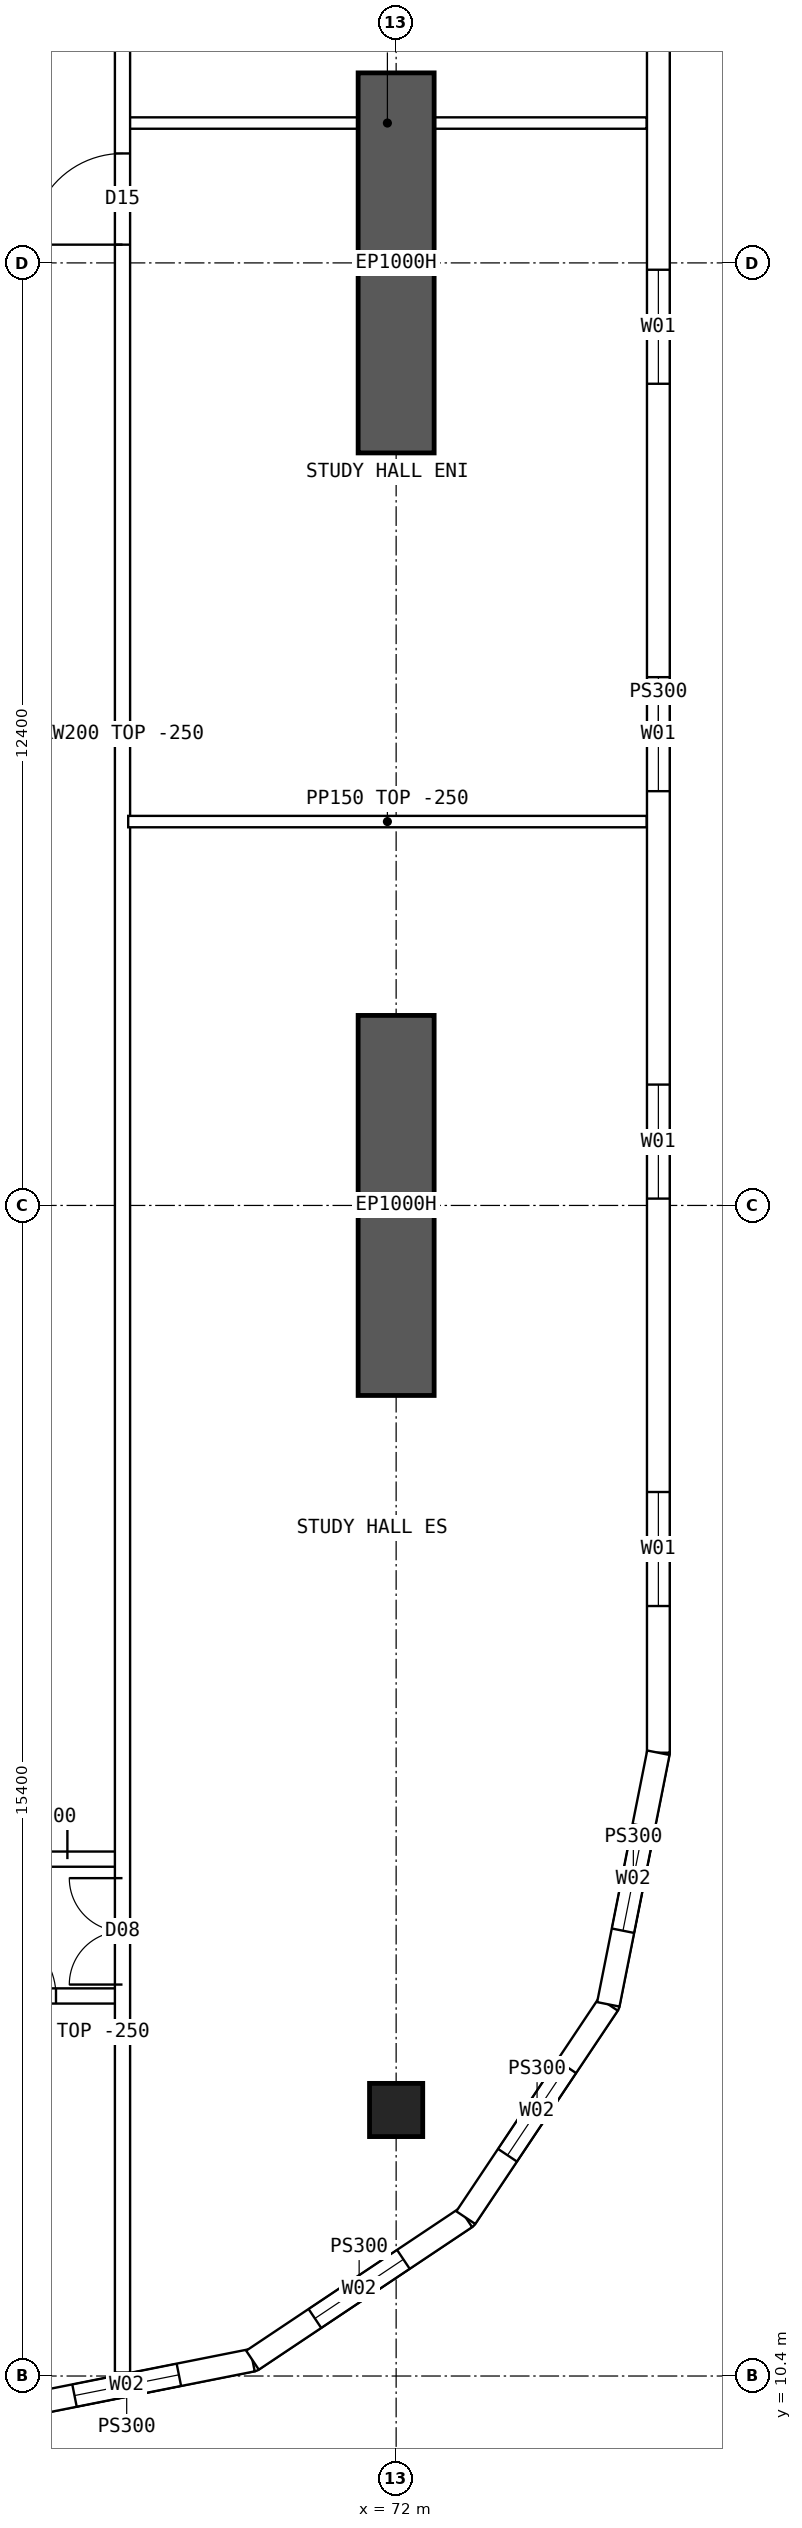
"""IFC4 building model, lengths in metres.
Left out: names, types, materials, properties, quantities, classifications, styles, units other than length and angle.
Written with IfcOpenShell. Run it as: python <this file> out.ifc"""

import sys

from ifc_helpers import new_model, si_unit, direction, frame, frame_2d, origin, origin_2d, place, context, subcontext, project, spatial, polyline, rectangle, hollow_rectangle, outline, extrude, element, fill, save


model = new_model("IFC4")
c1 = context("Model", 3, precision=1e-05, world=origin(), true_north=direction((0.0, 1.0)))
c2 = subcontext(c1, "Body", "Model", "MODEL_VIEW")
j1 = project(units=[si_unit("LENGTHUNIT", "METRE"), si_unit("PLANEANGLEUNIT", "RADIAN")], contexts=[c1])
p1 = place(None, origin())
s1 = spatial("IfcSite", under=j1, at=p1, CompositionType="ELEMENT")
p2 = place(p1, origin())
s2 = spatial("IfcBuilding", under=s1, at=p2, CompositionType="ELEMENT")
p3 = place(p2, frame((0.0, 0.0, 152.35)))
s3 = spatial("IfcBuildingStorey", under=s2, at=p3, CompositionType="ELEMENT", Elevation=152.35)
p4 = place(p3, frame((72.0, 13.9, 0.0), z_axis=(0.0, 0.0, 1.0), x_axis=(1.0, 0.0, 0.0)))
e1 = element("IfcColumn", 1, at=p4, inside=s3, PredefinedType="COLUMN", context=c2, shape_type="SweptSolid", body=[
    extrude(hollow_rectangle(XDim=0.7, YDim=0.7, WallThickness=0.07, at=origin_2d()), origin(), (0.0, 0.0, 1.0), 3.75),
])
for number, where, z_axis, x_axis in (
    (2, (72.0, 23.3, 0.0), (0.0, 0.0, 1.0), (0.0, 1.0, 0.0)),
    (3, (72.0, 35.7, 0.0), (0.0, 0.0, 1.0), (0.0, 1.0, 0.0)),
):
    element("IfcWall", number, at=place(p3, frame(where, z_axis=z_axis, x_axis=x_axis)), inside=s3, PredefinedType="SHEAR", context=c2, shape_type="SweptSolid", body=[
        extrude(rectangle(XDim=5.0, YDim=1.0, at=frame_2d((2.5, 0.0))), origin(), (0.0, 0.0, 1.0), 3.75),
    ])
p5 = place(p3, frame((75.45, 18.6, 0.0), z_axis=(0.0, 0.0, 1.0), x_axis=(0.0, 1.0, 0.0)))
e4 = element("IfcWall", 4, at=p5, inside=s3, PredefinedType="SOLIDWALL", context=c2, shape_type="SweptSolid", body=[
    extrude(outline(polyline([(-0.015, -0.15), (26.815, -0.15), (26.785, 0.15), (0.015, 0.15), (-0.015, -0.15)])), origin(), (0.0, 0.0, 1.0), 3.5),
])
p6 = place(p5, frame((1.93, 0.0, 0.9)))
e5 = element("IfcOpeningElement", 5, at=p6, cuts=e4, PredefinedType="OPENING", context=c2, shape_type="SweptSolid", body=[
    extrude(rectangle(XDim=1.5, YDim=2.0, at=frame_2d((0.75, 1.0))), frame((0.0, 0.16, 0.0), z_axis=(0.0, -1.0, 0.0), x_axis=(1.0, 0.0, 0.0)), (0.0, 0.0, 1.0), 0.32),
])
p7 = place(p5, frame((7.29, 0.0, 0.9)))
e6 = element("IfcOpeningElement", 6, at=p7, cuts=e4, PredefinedType="OPENING", context=c2, shape_type="SweptSolid", body=[
    extrude(rectangle(XDim=1.5, YDim=2.0, at=frame_2d((0.75, 1.0))), frame((0.0, 0.16, 0.0), z_axis=(0.0, -1.0, 0.0), x_axis=(1.0, 0.0, 0.0)), (0.0, 0.0, 1.0), 0.32),
])
p8 = place(p5, frame((12.65, 0.0, 0.9)))
e7 = element("IfcOpeningElement", 7, at=p8, cuts=e4, PredefinedType="OPENING", context=c2, shape_type="SweptSolid", body=[
    extrude(rectangle(XDim=1.5, YDim=2.0, at=frame_2d((0.75, 1.0))), frame((0.0, 0.16, 0.0), z_axis=(0.0, -1.0, 0.0), x_axis=(1.0, 0.0, 0.0)), (0.0, 0.0, 1.0), 0.32),
])
p9 = place(p5, frame((18.01, 0.0, 0.9)))
e8 = element("IfcOpeningElement", 8, at=p9, cuts=e4, PredefinedType="OPENING", context=c2, shape_type="SweptSolid", body=[
    extrude(rectangle(XDim=1.5, YDim=2.0, at=frame_2d((0.75, 1.0))), frame((0.0, 0.16, 0.0), z_axis=(0.0, -1.0, 0.0), x_axis=(1.0, 0.0, 0.0)), (0.0, 0.0, 1.0), 0.32),
])
p10 = place(p5, frame((23.37, 0.0, 0.9)))
e9 = element("IfcOpeningElement", 9, at=p10, cuts=e4, PredefinedType="OPENING", context=c2, shape_type="SweptSolid", body=[
    extrude(rectangle(XDim=1.5, YDim=2.0, at=frame_2d((0.75, 1.0))), frame((0.0, 0.16, 0.0), z_axis=(0.0, -1.0, 0.0), x_axis=(1.0, 0.0, 0.0)), (0.0, 0.0, 1.0), 0.32),
])
p11 = place(p3, frame((66.8, 9.95, 0.0), z_axis=(0.0, 0.0, 1.0), x_axis=(0.98078325777, 0.195100490205, 0.0)))
e10 = element("IfcWall", 10, at=p11, inside=s3, PredefinedType="SOLIDWALL", context=c2, shape_type="SweptSolid", body=[
    extrude(outline(polyline([(-0.03, -0.15), (3.405, -0.15), (3.345, 0.15), (0.03, 0.15), (-0.03, -0.15)])), origin(), (0.0, 0.0, 1.0), 3.5),
])
p12 = place(p11, frame((0.988, 0.0, 0.9)))
e11 = element("IfcOpeningElement", 11, at=p12, cuts=e10, PredefinedType="OPENING", context=c2, shape_type="SweptSolid", body=[
    extrude(rectangle(XDim=1.4, YDim=1.8, at=frame_2d((0.7, 0.9))), frame((0.0, 0.16, 0.0), z_axis=(0.0, -1.0, 0.0), x_axis=(1.0, 0.0, 0.0)), (0.0, 0.0, 1.0), 0.32),
])
p13 = place(p3, frame((70.11, 10.608, 0.0), z_axis=(0.0, 0.0, 1.0), x_axis=(0.831493450887, 0.555534554399, 0.0)))
e12 = element("IfcWall", 12, at=p13, inside=s3, PredefinedType="SOLIDWALL", context=c2, shape_type="SweptSolid", body=[
    extrude(outline(polyline([(-0.03, -0.15), (3.405, -0.15), (3.345, 0.15), (0.03, 0.15), (-0.03, -0.15)])), origin(), (0.0, 0.0, 1.0), 3.5),
])
p14 = place(p13, frame((0.988, 0.0, 0.9)))
e13 = element("IfcOpeningElement", 13, at=p14, cuts=e12, PredefinedType="OPENING", context=c2, shape_type="SweptSolid", body=[
    extrude(rectangle(XDim=1.4, YDim=1.8, at=frame_2d((0.7, 0.9))), frame((0.0, 0.16, 0.0), z_axis=(0.0, -1.0, 0.0), x_axis=(1.0, 0.0, 0.0)), (0.0, 0.0, 1.0), 0.32),
])
p15 = place(p3, frame((72.917, 12.483, 0.0), z_axis=(0.0, 0.0, 1.0), x_axis=(0.555534554399, 0.831493450887, 0.0)))
e14 = element("IfcWall", 14, at=p15, inside=s3, PredefinedType="SOLIDWALL", context=c2, shape_type="SweptSolid", body=[
    extrude(outline(polyline([(-0.03, -0.15), (3.405, -0.15), (3.345, 0.15), (0.03, 0.15), (-0.03, -0.15)])), origin(), (0.0, 0.0, 1.0), 3.5),
])
p16 = place(p15, frame((0.988, 0.0, 0.9)))
e15 = element("IfcOpeningElement", 15, at=p16, cuts=e14, PredefinedType="OPENING", context=c2, shape_type="SweptSolid", body=[
    extrude(rectangle(XDim=1.4, YDim=1.8, at=frame_2d((0.7, 0.9))), frame((0.0, 0.16, 0.0), z_axis=(0.0, -1.0, 0.0), x_axis=(1.0, 0.0, 0.0)), (0.0, 0.0, 1.0), 0.32),
])
p17 = place(p3, frame((74.792, 15.29, 0.0), z_axis=(0.0, 0.0, 1.0), x_axis=(0.19508664885, 0.980786011034, 0.0)))
e16 = element("IfcWall", 16, at=p17, inside=s3, PredefinedType="SOLIDWALL", context=c2, shape_type="SweptSolid", body=[
    extrude(outline(polyline([(-0.03, -0.15), (3.39, -0.15), (3.36, 0.15), (0.03, 0.15), (-0.03, -0.15)])), origin(), (0.0, 0.0, 1.0), 3.5),
])
p18 = place(p17, frame((0.988, 0.0, 0.9)))
e17 = element("IfcOpeningElement", 17, at=p18, cuts=e16, PredefinedType="OPENING", context=c2, shape_type="SweptSolid", body=[
    extrude(rectangle(XDim=1.4, YDim=1.8, at=frame_2d((0.7, 0.9))), frame((0.0, 0.16, 0.0), z_axis=(0.0, -1.0, 0.0), x_axis=(1.0, 0.0, 0.0)), (0.0, 0.0, 1.0), 0.32),
])
p19 = place(p3, frame((66.425, 15.4, 0.0), z_axis=(0.0, 0.0, 1.0), x_axis=(1.0, 0.0, 0.0)))
e18 = element("IfcWall", 18, at=p19, inside=s3, PredefinedType="SOLIDWALL", context=c2, shape_type="SweptSolid", body=[
    extrude(rectangle(XDim=1.975, YDim=0.2, at=frame_2d((0.987, 0.0))), origin(), (0.0, 0.0, 1.0), 3.5),
])
p20 = place(p19, frame((0.2, 0.0, 0.0)))
e19 = element("IfcOpeningElement", 19, at=p20, cuts=e18, PredefinedType="OPENING", context=c2, shape_type="SweptSolid", body=[
    extrude(rectangle(XDim=0.9, YDim=2.1, at=frame_2d((0.45, 1.05))), frame((0.0, 0.11, 0.0), z_axis=(0.0, -1.0, 0.0), x_axis=(1.0, 0.0, 0.0)), (0.0, 0.0, 1.0), 0.22),
])
p21 = place(p3, frame((66.425, 17.2, 0.0), z_axis=(0.0, 0.0, 1.0), x_axis=(1.0, 0.0, 0.0)))
e20 = element("IfcWall", 20, at=p21, inside=s3, PredefinedType="SOLIDWALL", context=c2, shape_type="SweptSolid", body=[
    extrude(rectangle(XDim=1.975, YDim=0.2, at=frame_2d((0.987, 0.0))), origin(), (0.0, 0.0, 1.0), 3.5),
])
p22 = place(p21, frame((0.05, 0.0, 0.0)))
e21 = element("IfcOpeningElement", 21, at=p22, cuts=e20, PredefinedType="OPENING", context=c2, shape_type="SweptSolid", body=[
    extrude(rectangle(XDim=1.2, YDim=2.1, at=frame_2d((0.6, 1.05))), frame((0.0, 0.11, 0.0), z_axis=(0.0, -1.0, 0.0), x_axis=(1.0, 0.0, 0.0)), (0.0, 0.0, 1.0), 0.22),
])
p23 = place(p3, frame((68.475, 30.85, 0.0), z_axis=(0.0, 0.0, 1.0), x_axis=(1.0, 0.0, 0.0)))
e22 = element("IfcWall", 22, at=p23, inside=s3, PredefinedType="PARTITIONING", context=c2, shape_type="SweptSolid", body=[
    extrude(outline(polyline([(0.0, 0.0), (6.82, 0.0), (6.82, 3.5), (3.827, 3.5), (3.825, 3.05), (3.227, 3.05), (3.225, 3.5), (0.0, 3.5), (0.0, 0.0)])), frame((0.0, 0.075, 0.0), z_axis=(0.0, -1.0, 0.0), x_axis=(1.0, 0.0, 0.0)), (0.0, 0.0, 1.0), 0.15),
])
p24 = place(p3, frame((68.4, 10.446, 0.0), z_axis=(0.0, 0.0, 1.0), x_axis=(0.0, 1.0, 0.0)))
e23 = element("IfcWall", 23, at=p24, inside=s3, PredefinedType="SOLIDWALL", context=c2, shape_type="SweptSolid", body=[
    extrude(rectangle(XDim=43.107, YDim=0.2, at=frame_2d((21.554, 0.0))), origin(), (0.0, 0.0, 1.0), 3.5),
])
p25 = place(p24, frame((27.994, 0.0, 0.0)))
e24 = element("IfcOpeningElement", 24, at=p25, cuts=e23, PredefinedType="OPENING", context=c2, shape_type="SweptSolid", body=[
    extrude(rectangle(XDim=1.2, YDim=2.1, at=frame_2d((0.6, 1.05))), frame((0.0, 0.11, 0.0), z_axis=(0.0, -1.0, 0.0), x_axis=(1.0, 0.0, 0.0)), (0.0, 0.0, 1.0), 0.22),
])
p26 = place(p24, frame((5.104, 0.0, 0.0)))
e25 = element("IfcOpeningElement", 25, at=p26, cuts=e23, PredefinedType="OPENING", context=c2, shape_type="SweptSolid", body=[
    extrude(rectangle(XDim=1.4, YDim=2.1, at=frame_2d((0.7, 1.05))), frame((0.0, 0.11, 0.0), z_axis=(0.0, -1.0, 0.0), x_axis=(1.0, 0.0, 0.0)), (0.0, 0.0, 1.0), 0.22),
])
p27 = place(p24, frame((36.504, 0.0, 0.0)))
e26 = element("IfcOpeningElement", 26, at=p27, cuts=e23, PredefinedType="OPENING", context=c2, shape_type="SweptSolid", body=[
    extrude(rectangle(XDim=1.4, YDim=2.1, at=frame_2d((0.7, 1.05))), frame((0.0, 0.11, 0.0), z_axis=(0.0, -1.0, 0.0), x_axis=(1.0, 0.0, 0.0)), (0.0, 0.0, 1.0), 0.22),
])
p28 = place(p3, frame((68.475, 40.04, 0.0), z_axis=(0.0, 0.0, 1.0), x_axis=(1.0, 0.0, 0.0)))
e27 = element("IfcWall", 27, at=p28, inside=s3, PredefinedType="PARTITIONING", context=c2, shape_type="SweptSolid", body=[
    extrude(rectangle(XDim=6.82, YDim=0.15, at=frame_2d((3.41, 0.0))), origin(), (0.0, 0.0, 1.0), 3.5),
])
p29 = place(p6, origin())
e28 = element("IfcWindow", 28, at=p29, inside=s3, PartitioningType="SINGLE_PANEL", PredefinedType="WINDOW", context=c2, shape_type="SweptSolid", body=[
    extrude(rectangle(XDim=1.5, YDim=2.0, at=frame_2d((0.75, 1.0))), frame((0.0, 0.03, 0.0), z_axis=(0.0, -1.0, 0.0), x_axis=(1.0, 0.0, 0.0)), (0.0, 0.0, 1.0), 0.06),
])
fill(e5, e28)
p30 = place(p7, origin())
e29 = element("IfcWindow", 29, at=p30, inside=s3, PartitioningType="SINGLE_PANEL", PredefinedType="WINDOW", context=c2, shape_type="SweptSolid", body=[
    extrude(rectangle(XDim=1.5, YDim=2.0, at=frame_2d((0.75, 1.0))), frame((0.0, 0.03, 0.0), z_axis=(0.0, -1.0, 0.0), x_axis=(1.0, 0.0, 0.0)), (0.0, 0.0, 1.0), 0.06),
])
fill(e6, e29)
p31 = place(p8, origin())
e30 = element("IfcWindow", 30, at=p31, inside=s3, PartitioningType="SINGLE_PANEL", PredefinedType="WINDOW", context=c2, shape_type="SweptSolid", body=[
    extrude(rectangle(XDim=1.5, YDim=2.0, at=frame_2d((0.75, 1.0))), frame((0.0, 0.03, 0.0), z_axis=(0.0, -1.0, 0.0), x_axis=(1.0, 0.0, 0.0)), (0.0, 0.0, 1.0), 0.06),
])
fill(e7, e30)
p32 = place(p9, origin())
e31 = element("IfcWindow", 31, at=p32, inside=s3, PartitioningType="SINGLE_PANEL", PredefinedType="WINDOW", context=c2, shape_type="SweptSolid", body=[
    extrude(rectangle(XDim=1.5, YDim=2.0, at=frame_2d((0.75, 1.0))), frame((0.0, 0.03, 0.0), z_axis=(0.0, -1.0, 0.0), x_axis=(1.0, 0.0, 0.0)), (0.0, 0.0, 1.0), 0.06),
])
fill(e8, e31)
p33 = place(p12, origin())
e32 = element("IfcWindow", 32, at=p33, inside=s3, PartitioningType="SINGLE_PANEL", PredefinedType="WINDOW", context=c2, shape_type="SweptSolid", body=[
    extrude(rectangle(XDim=1.4, YDim=1.8, at=frame_2d((0.7, 0.9))), frame((0.0, 0.03, 0.0), z_axis=(0.0, -1.0, 0.0), x_axis=(1.0, 0.0, 0.0)), (0.0, 0.0, 1.0), 0.06),
])
fill(e11, e32)
p34 = place(p14, origin())
e33 = element("IfcWindow", 33, at=p34, inside=s3, PartitioningType="SINGLE_PANEL", PredefinedType="WINDOW", context=c2, shape_type="SweptSolid", body=[
    extrude(rectangle(XDim=1.4, YDim=1.8, at=frame_2d((0.7, 0.9))), frame((0.0, 0.03, 0.0), z_axis=(0.0, -1.0, 0.0), x_axis=(1.0, 0.0, 0.0)), (0.0, 0.0, 1.0), 0.06),
])
fill(e13, e33)
p35 = place(p16, origin())
e34 = element("IfcWindow", 34, at=p35, inside=s3, PartitioningType="SINGLE_PANEL", PredefinedType="WINDOW", context=c2, shape_type="SweptSolid", body=[
    extrude(rectangle(XDim=1.4, YDim=1.8, at=frame_2d((0.7, 0.9))), frame((0.0, 0.03, 0.0), z_axis=(0.0, -1.0, 0.0), x_axis=(1.0, 0.0, 0.0)), (0.0, 0.0, 1.0), 0.06),
])
fill(e15, e34)
p36 = place(p18, origin())
e35 = element("IfcWindow", 35, at=p36, inside=s3, PartitioningType="SINGLE_PANEL", PredefinedType="WINDOW", context=c2, shape_type="SweptSolid", body=[
    extrude(rectangle(XDim=1.4, YDim=1.8, at=frame_2d((0.7, 0.9))), frame((0.0, 0.03, 0.0), z_axis=(0.0, -1.0, 0.0), x_axis=(1.0, 0.0, 0.0)), (0.0, 0.0, 1.0), 0.06),
])
fill(e17, e35)
p37 = place(p22, origin())
e36 = element("IfcDoor", 36, at=p37, inside=s3, OperationType="DOUBLE_DOOR_SINGLE_SWING", PredefinedType="DOOR", context=c2, shape_type="SweptSolid", body=[
    extrude(rectangle(XDim=1.2, YDim=2.1, at=frame_2d((0.6, 1.05))), frame((0.0, 0.025, 0.0), z_axis=(0.0, -1.0, 0.0), x_axis=(1.0, 0.0, 0.0)), (0.0, 0.0, 1.0), 0.05),
])
fill(e21, e36)
p38 = place(p25, origin())
e37 = element("IfcDoor", 37, at=p38, inside=s3, OperationType="SINGLE_SWING_LEFT", PredefinedType="DOOR", context=c2, shape_type="SweptSolid", body=[
    extrude(rectangle(XDim=1.2, YDim=2.1, at=frame_2d((0.6, 1.05))), frame((0.0, 0.025, 0.0), z_axis=(0.0, -1.0, 0.0), x_axis=(1.0, 0.0, 0.0)), (0.0, 0.0, 1.0), 0.05),
])
fill(e24, e37)
p39 = place(p26, origin())
e38 = element("IfcDoor", 38, at=p39, inside=s3, OperationType="DOUBLE_DOOR_SINGLE_SWING", PredefinedType="DOOR", context=c2, shape_type="SweptSolid", body=[
    extrude(rectangle(XDim=1.4, YDim=2.1, at=frame_2d((0.7, 1.05))), frame((0.0, 0.025, 0.0), z_axis=(0.0, -1.0, 0.0), x_axis=(1.0, 0.0, 0.0)), (0.0, 0.0, 1.0), 0.05),
])
fill(e25, e38)
p40 = place(p20, origin())
e39 = element("IfcDoor", 39, at=p40, inside=s3, OperationType="SINGLE_SWING_LEFT", PredefinedType="DOOR", context=c2, shape_type="SweptSolid", body=[
    extrude(rectangle(XDim=0.9, YDim=2.1, at=frame_2d((0.45, 1.05))), frame((0.0, 0.025, 0.0), z_axis=(0.0, -1.0, 0.0), x_axis=(1.0, 0.0, 0.0)), (0.0, 0.0, 1.0), 0.05),
])
fill(e19, e39)
save(model, sys.argv[1])
